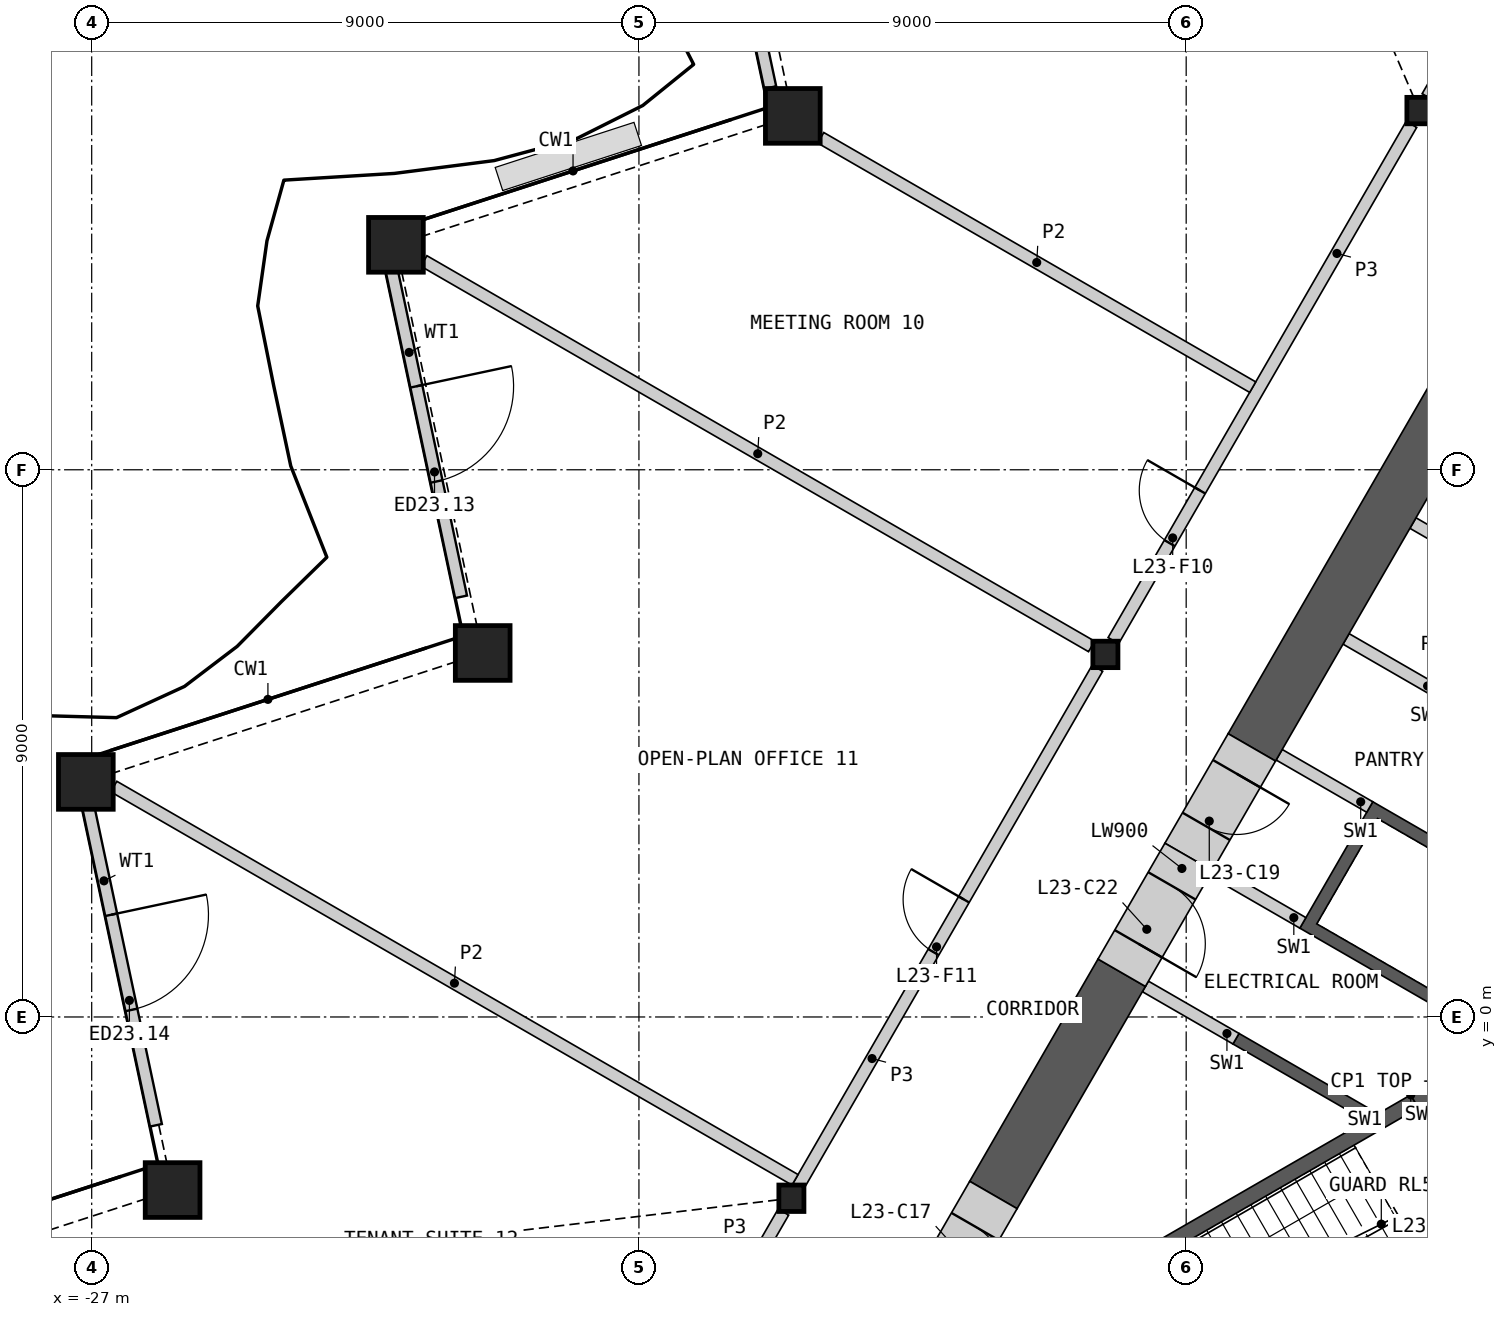
"""IFC4 building model, lengths in metres.
Left out: names, types, materials, properties, quantities, classifications, styles, units other than length and angle.
Written with IfcOpenShell. Run it as: python <this file> out.ifc"""

import sys

from ifc_helpers import new_model, si_unit, direction, frame, frame_2d, origin, origin_2d, place, context, subcontext, project, spatial, polyline, rectangle, hollow_rectangle, i_section, outline, extrude, element, fill, save


model = new_model("IFC4")
c1 = context("Model", 3, precision=1e-05, world=origin(), true_north=direction((0.0, 1.0)))
c2 = subcontext(c1, "Body", "Model", "MODEL_VIEW")
j1 = project(units=[si_unit("LENGTHUNIT", "METRE"), si_unit("PLANEANGLEUNIT", "RADIAN")], contexts=[c1])
p1 = place(None, origin())
s1 = spatial("IfcSite", under=j1, at=p1, CompositionType="ELEMENT")
p2 = place(p1, origin())
s2 = spatial("IfcBuilding", under=s1, at=p2, CompositionType="ELEMENT")
p3 = place(p2, frame((0.0, 0.0, 112.2)))
s3 = spatial("IfcBuildingStorey", under=s2, at=p3, CompositionType="ELEMENT", Elevation=112.2)
for number, where, z_axis, x_axis in (
    (1, (-15.469, 14.82, 0.0), (0.0, 0.0, 1.0), (1.0, 0.0, 0.0)),
    (2, (-21.996, 12.699, 0.0), (0.0, 0.0, 1.0), (1.0, 0.0, 0.0)),
    (3, (-20.57, 5.987, 0.0), (0.0, 0.0, 1.0), (1.0, 0.0, 0.0)),
    (4, (-27.096, 3.866, 0.0), (0.0, 0.0, 1.0), (1.0, 0.0, 0.0)),
    (5, (-25.669, -2.846, 0.0), (0.0, 0.0, 1.0), (1.0, 0.0, 0.0)),
):
    element("IfcColumn", number, at=place(p3, frame(where, z_axis=z_axis, x_axis=x_axis)), inside=s3, PredefinedType="COLUMN", context=c2, shape_type="SweptSolid", body=[
        extrude(hollow_rectangle(XDim=0.9, YDim=0.9, WallThickness=0.06, at=origin_2d()), origin(), (0.0, 0.0, 1.0), 4.2),
    ])
for number, where, z_axis, x_axis in (
    (6, (-5.164, 14.908, 0.0), (0.0, 0.0, 1.0), (1.0, 0.0, 0.0)),
    (7, (-10.328, 5.963, 0.0), (0.0, 0.0, 1.0), (1.0, 0.0, 0.0)),
    (8, (-15.493, -2.982, 0.0), (0.0, 0.0, 1.0), (1.0, 0.0, 0.0)),
):
    element("IfcColumn", number, at=place(p3, frame(where, z_axis=z_axis, x_axis=x_axis)), inside=s3, PredefinedType="COLUMN", context=c2, shape_type="SweptSolid", body=[
        extrude(i_section(OverallWidth=0.412, OverallDepth=0.435, WebThickness=0.036, FlangeThickness=0.057, at=origin_2d()), origin(), (0.0, 0.0, 1.0), 4.2),
    ])
p4 = place(p3, frame((-17.069, 21.066, 0.0), z_axis=(0.0, 0.0, 1.0), x_axis=(0.207917562075, -0.978146352741, 0.0)))
e9 = element("IfcWall", 9, at=p4, inside=s3, PredefinedType="SOLIDWALL", context=c2, shape_type="SweptSolid", body=[
    extrude(rectangle(XDim=5.909, YDim=0.2, at=frame_2d((2.954, 0.0))), origin(), (0.0, 0.0, 1.0), 3.189),
])
p5 = place(p4, frame((2.047, 0.0, 0.0)))
e10 = element("IfcOpeningElement", 10, at=p5, cuts=e9, PredefinedType="OPENING", context=c2, shape_type="SweptSolid", body=[
    extrude(rectangle(XDim=1.6, YDim=2.4, at=frame_2d((0.8, 1.2))), frame((0.0, 0.11, 0.0), z_axis=(0.0, -1.0, 0.0), x_axis=(1.0, 0.0, 0.0)), (0.0, 0.0, 1.0), 0.22),
])
p6 = place(p3, frame((-22.065, 12.271, 0.0), z_axis=(0.0, 0.0, 1.0), x_axis=(0.207907239961, -0.978148546782, 0.0)))
e11 = element("IfcWall", 11, at=p6, inside=s3, PredefinedType="SOLIDWALL", context=c2, shape_type="SweptSolid", body=[
    extrude(rectangle(XDim=5.48, YDim=0.2, at=frame_2d((2.74, 0.0))), origin(), (0.0, 0.0, 1.0), 3.189),
])
p7 = place(p6, frame((1.94, 0.0, 0.0)))
e12 = element("IfcOpeningElement", 12, at=p7, cuts=e11, PredefinedType="OPENING", context=c2, shape_type="SweptSolid", body=[
    extrude(rectangle(XDim=1.6, YDim=2.4, at=frame_2d((0.8, 1.2))), frame((0.0, 0.11, 0.0), z_axis=(0.0, -1.0, 0.0), x_axis=(1.0, 0.0, 0.0)), (0.0, 0.0, 1.0), 0.22),
])
p8 = place(p3, frame((-27.083, 3.579, 0.0), z_axis=(0.0, 0.0, 1.0), x_axis=(0.207898180805, -0.978150472278, 0.0)))
e13 = element("IfcWall", 13, at=p8, inside=s3, PredefinedType="SOLIDWALL", context=c2, shape_type="SweptSolid", body=[
    extrude(rectangle(XDim=5.48, YDim=0.2, at=frame_2d((2.74, 0.0))), origin(), (0.0, 0.0, 1.0), 3.189),
])
p9 = place(p8, frame((1.94, 0.0, 0.0)))
e14 = element("IfcOpeningElement", 14, at=p9, cuts=e13, PredefinedType="OPENING", context=c2, shape_type="SweptSolid", body=[
    extrude(rectangle(XDim=1.6, YDim=2.4, at=frame_2d((0.8, 1.2))), frame((0.0, 0.11, 0.0), z_axis=(0.0, -1.0, 0.0), x_axis=(1.0, 0.0, 0.0)), (0.0, 0.0, 1.0), 0.22),
])
p10 = place(p3, origin())
e15 = element("IfcWall", 15, at=p10, inside=s3, PredefinedType="SHEAR", context=c2, shape_type="SweptSolid", body=[
    extrude(outline(polyline([(-6.061, -1.697), (-8.231, -0.444), (-8.131, -0.271), (-5.96, -1.524), (-6.061, -1.697)])), origin(), (0.0, 0.0, 1.0), 3.8),
])
p11 = place(p3, origin())
e16 = element("IfcWall", 16, at=p11, inside=s3, PredefinedType="SHEAR", context=c2, shape_type="SweptSolid", body=[
    extrude(outline(polyline([(-4.96, 0.208), (-7.131, 1.461), (-5.931, 3.54), (-3.76, 2.287), (-3.861, 2.113), (-5.852, 3.263), (-6.852, 1.531), (-4.861, 0.381), (-4.96, 0.208)])), origin(), (0.0, 0.0, 1.0), 3.8),
])
for number, where, z_axis, x_axis in (
    (17, (-3.781, 7.263, 0.0), (0.0, 0.0, 1.0), (-0.866, 0.5, 0.0)),
    (18, (-4.881, 5.358, 0.0), (0.0, 0.0, 1.0), (-0.866, 0.5, 0.0)),
):
    element("IfcWall", number, at=place(p3, frame(where, z_axis=z_axis, x_axis=x_axis)), inside=s3, PredefinedType="SHEAR", context=c2, shape_type="SweptSolid", body=[
        extrude(rectangle(XDim=1.72, YDim=0.2, at=frame_2d((0.86, 0.0))), origin(), (0.0, 0.0, 1.0), 3.8),
    ])
p12 = place(p3, frame((-5.981, 3.453, 0.0), z_axis=(0.0, 0.0, 1.0), x_axis=(-0.866060346521, 0.499939472521, 0.0)))
e19 = element("IfcWall", 19, at=p12, inside=s3, PredefinedType="SHEAR", context=c2, shape_type="SweptSolid", body=[
    extrude(rectangle(XDim=1.72, YDim=0.2, at=frame_2d((0.86, 0.0))), origin(), (0.0, 0.0, 1.0), 3.8),
])
for number, where, z_axis, x_axis in (
    (20, (-7.081, 1.548, 0.0), (0.0, 0.0, 1.0), (-0.866, 0.5, 0.0)),
    (21, (-8.181, -0.357, 0.0), (0.0, 0.0, 1.0), (-0.866, 0.5, 0.0)),
):
    element("IfcWall", number, at=place(p3, frame(where, z_axis=z_axis, x_axis=x_axis)), inside=s3, PredefinedType="SHEAR", context=c2, shape_type="SweptSolid", body=[
        extrude(rectangle(XDim=1.72, YDim=0.2, at=frame_2d((0.86, 0.0))), origin(), (0.0, 0.0, 1.0), 3.8),
    ])
p13 = place(p3, origin())
e22 = element("IfcWall", 22, at=p13, inside=s3, PredefinedType="SHEAR", context=c2, shape_type="SweptSolid", body=[
    extrude(outline(polyline([(-5.307, -1.281), (-10.374, -4.206), (-10.032, -4.298), (-5.182, -1.498), (-5.307, -1.281)])), origin(), (0.0, 0.0, 1.0), 3.8),
])
p14 = place(p3, frame((-5.199, -1.219, 0.0), z_axis=(0.0, 0.0, 1.0), x_axis=(0.499982516597, -0.866035497597, 0.0)))
e23 = element("IfcWall", 23, at=p14, inside=s3, PredefinedType="SHEAR", context=c2, shape_type="SweptSolid", body=[
    extrude(rectangle(XDim=3.088, YDim=0.25, at=frame_2d((1.544, 0.0))), origin(), (0.0, 0.0, 1.0), 3.8),
])
p15 = place(p14, frame((0.994, 0.0, 0.0)))
e24 = element("IfcOpeningElement", 24, at=p15, cuts=e23, PredefinedType="OPENING", context=c2, shape_type="SweptSolid", body=[
    extrude(rectangle(XDim=1.1, YDim=2.1, at=frame_2d((0.55, 1.05))), frame((0.0, 0.135, 0.0), z_axis=(0.0, -1.0, 0.0), x_axis=(1.0, 0.0, 0.0)), (0.0, 0.0, 1.0), 0.27),
])
p16 = place(p3, frame((-3.55, 12.004, 0.0), z_axis=(0.0, 0.0, 1.0), x_axis=(-0.499993245289, -0.866029303583, 0.0)))
e25 = element("IfcWall", 25, at=p16, inside=s3, PredefinedType="SHEAR", context=c2, shape_type="SweptSolid", body=[
    extrude(rectangle(XDim=8.741, YDim=0.9, at=frame_2d((4.37, 0.0))), origin(), (0.0, 0.0, 1.0), 3.8),
])
p17 = place(p3, frame((-10.06, 0.728, 0.0), z_axis=(0.0, 0.0, 1.0), x_axis=(-0.500021220092, -0.866013152012, 0.0)))
e26 = element("IfcWall", 26, at=p17, inside=s3, PredefinedType="SHEAR", context=c2, shape_type="SweptSolid", body=[
    extrude(rectangle(XDim=4.22, YDim=0.9, at=frame_2d((2.11, 0.0))), origin(), (0.0, 0.0, 1.0), 3.8),
])
p18 = place(p3, frame((-12.171, -2.927, 0.0), z_axis=(0.0, 0.0, 1.0), x_axis=(-0.499946605688, -0.86605622881, 0.0)))
e27 = element("IfcWall", 27, at=p18, inside=s3, PredefinedType="SHEAR", context=c2, shape_type="SweptSolid", body=[
    extrude(rectangle(XDim=2.2, YDim=0.9, at=frame_2d((1.1, 0.0))), origin(), (0.0, 0.0, 1.0), 3.8),
])
p19 = place(p18, frame((0.6, 0.0, 0.0)))
e28 = element("IfcOpeningElement", 28, at=p19, cuts=e27, PredefinedType="OPENING", context=c2, shape_type="SweptSolid", body=[
    extrude(rectangle(XDim=1.0, YDim=2.1, at=frame_2d((0.5, 1.05))), frame((0.0, 0.46, 0.0), z_axis=(0.0, -1.0, 0.0), x_axis=(1.0, 0.0, 0.0)), (0.0, 0.0, 1.0), 0.92),
])
p20 = place(p3, frame((-7.92, 4.434, 0.0), z_axis=(0.0, 0.0, 1.0), x_axis=(-0.499939227269, -0.866060488094, 0.0)))
e29 = element("IfcWall", 29, at=p20, inside=s3, PredefinedType="SHEAR", context=c2, shape_type="SweptSolid", body=[
    extrude(rectangle(XDim=2.08, YDim=0.9, at=frame_2d((1.04, 0.0))), origin(), (0.0, 0.0, 1.0), 3.8),
])
p21 = place(p20, frame((0.5, 0.0, 0.0)))
e30 = element("IfcOpeningElement", 30, at=p21, cuts=e29, PredefinedType="OPENING", context=c2, shape_type="SweptSolid", body=[
    extrude(rectangle(XDim=1.0, YDim=2.1, at=frame_2d((0.5, 1.05))), frame((0.0, 0.46, 0.0), z_axis=(0.0, -1.0, 0.0), x_axis=(1.0, 0.0, 0.0)), (0.0, 0.0, 1.0), 0.92),
])
p22 = place(p3, frame((-8.96, 2.633, 0.0), z_axis=(0.0, 0.0, 1.0), x_axis=(-0.50002983664, -0.866008176907, 0.0)))
e31 = element("IfcWall", 31, at=p22, inside=s3, PredefinedType="SHEAR", context=c2, shape_type="SweptSolid", body=[
    extrude(rectangle(XDim=2.2, YDim=0.9, at=frame_2d((1.1, 0.0))), origin(), (0.0, 0.0, 1.0), 3.8),
])
p23 = place(p22, frame((0.55, 0.0, 0.0)))
e32 = element("IfcOpeningElement", 32, at=p23, cuts=e31, PredefinedType="OPENING", context=c2, shape_type="SweptSolid", body=[
    extrude(rectangle(XDim=1.1, YDim=2.1, at=frame_2d((0.55, 1.05))), frame((0.0, 0.46, 0.0), z_axis=(0.0, -1.0, 0.0), x_axis=(1.0, 0.0, 0.0)), (0.0, 0.0, 1.0), 0.92),
])
p24 = place(p3, frame((-10.197, 6.19, 0.0), z_axis=(0.0, 0.0, 1.0), x_axis=(0.500012035596, 0.866018454918, 0.0)))
e33 = element("IfcWall", 33, at=p24, inside=s3, PredefinedType="PARTITIONING", context=c2, shape_type="SweptSolid", body=[
    extrude(rectangle(XDim=9.803, YDim=0.2, at=frame_2d((4.902, 0.0))), origin(), (0.0, 0.0, 1.0), 3.8),
])
p25 = place(p24, frame((1.851, 0.0, 0.0)))
e34 = element("IfcOpeningElement", 34, at=p25, cuts=e33, PredefinedType="OPENING", context=c2, shape_type="SweptSolid", body=[
    extrude(rectangle(XDim=1.0, YDim=2.1, at=frame_2d((0.5, 1.05))), frame((0.0, 0.11, 0.0), z_axis=(0.0, -1.0, 0.0), x_axis=(1.0, 0.0, 0.0)), (0.0, 0.0, 1.0), 0.22),
])
p26 = place(p3, frame((-15.402, -2.823, 0.0), z_axis=(0.0, 0.0, 1.0), x_axis=(0.500023237168, 0.866011987384, 0.0)))
e35 = element("IfcWall", 35, at=p26, inside=s3, PredefinedType="PARTITIONING", context=c2, shape_type="SweptSolid", body=[
    extrude(rectangle(XDim=9.883, YDim=0.2, at=frame_2d((4.942, 0.0))), origin(), (0.0, 0.0, 1.0), 3.8),
])
p27 = place(p26, frame((4.492, 0.0, 0.0)))
e36 = element("IfcOpeningElement", 36, at=p27, cuts=e35, PredefinedType="OPENING", context=c2, shape_type="SweptSolid", body=[
    extrude(rectangle(XDim=1.0, YDim=2.1, at=frame_2d((0.5, 1.05))), frame((0.0, 0.11, 0.0), z_axis=(0.0, -1.0, 0.0), x_axis=(1.0, 0.0, 0.0)), (0.0, 0.0, 1.0), 0.22),
])
p28 = place(p3, frame((-5.033, 15.135, 0.0), z_axis=(0.0, 0.0, 1.0), x_axis=(0.499980978912, 0.866036385336, 0.0)))
e37 = element("IfcWall", 37, at=p28, inside=s3, PredefinedType="PARTITIONING", context=c2, shape_type="SweptSolid", body=[
    extrude(rectangle(XDim=6.24, YDim=0.2, at=frame_2d((3.12, 0.0))), origin(), (0.0, 0.0, 1.0), 3.8),
])
p29 = place(p28, frame((2.169, 0.0, 0.0)))
e38 = element("IfcOpeningElement", 38, at=p29, cuts=e37, PredefinedType="OPENING", context=c2, shape_type="SweptSolid", body=[
    extrude(rectangle(XDim=1.8, YDim=2.1, at=frame_2d((0.9, 1.05))), frame((0.0, 0.11, 0.0), z_axis=(0.0, -1.0, 0.0), x_axis=(1.0, 0.0, 0.0)), (0.0, 0.0, 1.0), 0.22),
])
p30 = place(p3, frame((-18.744, -8.613, 0.0), z_axis=(0.0, 0.0, 1.0), x_axis=(0.499997920671, 0.866026604282, 0.0)))
e39 = element("IfcWall", 39, at=p30, inside=s3, PredefinedType="PARTITIONING", context=c2, shape_type="SweptSolid", body=[
    extrude(rectangle(XDim=6.24, YDim=0.2, at=frame_2d((3.12, 0.0))), origin(), (0.0, 0.0, 1.0), 3.8),
])
p31 = place(p30, frame((2.67, 0.0, 0.0)))
e40 = element("IfcOpeningElement", 40, at=p31, cuts=e39, PredefinedType="OPENING", context=c2, shape_type="SweptSolid", body=[
    extrude(rectangle(XDim=1.0, YDim=2.1, at=frame_2d((0.5, 1.05))), frame((0.0, 0.11, 0.0), z_axis=(0.0, -1.0, 0.0), x_axis=(1.0, 0.0, 0.0)), (0.0, 0.0, 1.0), 0.22),
])
p32 = place(p3, frame((-26.636, 3.79, 0.0), z_axis=(0.0, 0.0, 1.0), x_axis=(0.866029074283, -0.499993642455, 0.0)))
e41 = element("IfcWall", 41, at=p32, inside=s3, PredefinedType="PARTITIONING", context=c2, shape_type="SweptSolid", body=[
    extrude(rectangle(XDim=12.936, YDim=0.2, at=frame_2d((6.468, 0.0))), origin(), (0.0, 0.0, 1.0), 2.885),
])
p33 = place(p3, frame((-21.536, 12.434, 0.0), z_axis=(0.0, 0.0, 1.0), x_axis=(0.86602461759, -0.500001361726, 0.0)))
e42 = element("IfcWall", 42, at=p33, inside=s3, PredefinedType="PARTITIONING", context=c2, shape_type="SweptSolid", body=[
    extrude(rectangle(XDim=12.679, YDim=0.2, at=frame_2d((6.34, 0.0))), origin(), (0.0, 0.0, 1.0), 2.885),
])
p34 = place(p3, frame((-15.01, 14.46, 0.0), z_axis=(0.0, 0.0, 1.0), x_axis=(0.86602003489, -0.500009299083, 0.0)))
e43 = element("IfcWall", 43, at=p34, inside=s3, PredefinedType="PARTITIONING", context=c2, shape_type="SweptSolid", body=[
    extrude(rectangle(XDim=8.202, YDim=0.2, at=frame_2d((4.101, 0.0))), origin(), (0.0, 0.0, 1.0), 2.885),
])
p35 = place(p7, origin())
e44 = element("IfcDoor", 44, at=p35, inside=s3, OperationType="DOUBLE_DOOR_SINGLE_SWING", PredefinedType="DOOR", context=c2, shape_type="SweptSolid", body=[
    extrude(rectangle(XDim=1.6, YDim=2.4, at=frame_2d((0.8, 1.2))), frame((0.0, 0.025, 0.0), z_axis=(0.0, -1.0, 0.0), x_axis=(1.0, 0.0, 0.0)), (0.0, 0.0, 1.0), 0.05),
])
fill(e12, e44)
p36 = place(p9, origin())
e45 = element("IfcDoor", 45, at=p36, inside=s3, OperationType="DOUBLE_DOOR_SINGLE_SWING", PredefinedType="DOOR", context=c2, shape_type="SweptSolid", body=[
    extrude(rectangle(XDim=1.6, YDim=2.4, at=frame_2d((0.8, 1.2))), frame((0.0, 0.025, 0.0), z_axis=(0.0, -1.0, 0.0), x_axis=(1.0, 0.0, 0.0)), (0.0, 0.0, 1.0), 0.05),
])
fill(e14, e45)
p37 = place(p19, origin())
e46 = element("IfcDoor", 46, at=p37, inside=s3, OperationType="SINGLE_SWING_RIGHT", PredefinedType="DOOR", context=c2, shape_type="SweptSolid", body=[
    extrude(rectangle(XDim=1.0, YDim=2.1, at=frame_2d((0.5, 1.05))), frame((0.0, 0.205, 0.0), z_axis=(0.0, -1.0, 0.0), x_axis=(1.0, 0.0, 0.0)), (0.0, 0.0, 1.0), 0.05),
])
fill(e28, e46)
p38 = place(p21, origin())
e47 = element("IfcDoor", 47, at=p38, inside=s3, OperationType="SINGLE_SWING_LEFT", PredefinedType="DOOR", context=c2, shape_type="SweptSolid", body=[
    extrude(rectangle(XDim=1.0, YDim=2.1, at=frame_2d((0.5, 1.05))), frame((0.0, 0.205, 0.0), z_axis=(0.0, -1.0, 0.0), x_axis=(1.0, 0.0, 0.0)), (0.0, 0.0, 1.0), 0.05),
])
fill(e30, e47)
p39 = place(p23, origin())
e48 = element("IfcDoor", 48, at=p39, inside=s3, OperationType="SINGLE_SWING_RIGHT", PredefinedType="DOOR", context=c2, shape_type="SweptSolid", body=[
    extrude(rectangle(XDim=1.1, YDim=2.1, at=frame_2d((0.55, 1.05))), frame((0.0, 0.205, 0.0), z_axis=(0.0, -1.0, 0.0), x_axis=(1.0, 0.0, 0.0)), (0.0, 0.0, 1.0), 0.05),
])
fill(e32, e48)
p40 = place(p25, origin())
e49 = element("IfcDoor", 49, at=p40, inside=s3, OperationType="SINGLE_SWING_RIGHT", PredefinedType="DOOR", context=c2, shape_type="SweptSolid", body=[
    extrude(rectangle(XDim=1.0, YDim=2.1, at=frame_2d((0.5, 1.05))), frame((0.0, 0.025, 0.0), z_axis=(0.0, -1.0, 0.0), x_axis=(1.0, 0.0, 0.0)), (0.0, 0.0, 1.0), 0.05),
])
fill(e34, e49)
p41 = place(p27, origin())
e50 = element("IfcDoor", 50, at=p41, inside=s3, OperationType="SINGLE_SWING_RIGHT", PredefinedType="DOOR", context=c2, shape_type="SweptSolid", body=[
    extrude(rectangle(XDim=1.0, YDim=2.1, at=frame_2d((0.5, 1.05))), frame((0.0, 0.025, 0.0), z_axis=(0.0, -1.0, 0.0), x_axis=(1.0, 0.0, 0.0)), (0.0, 0.0, 1.0), 0.05),
])
fill(e36, e50)
save(model, sys.argv[1])
